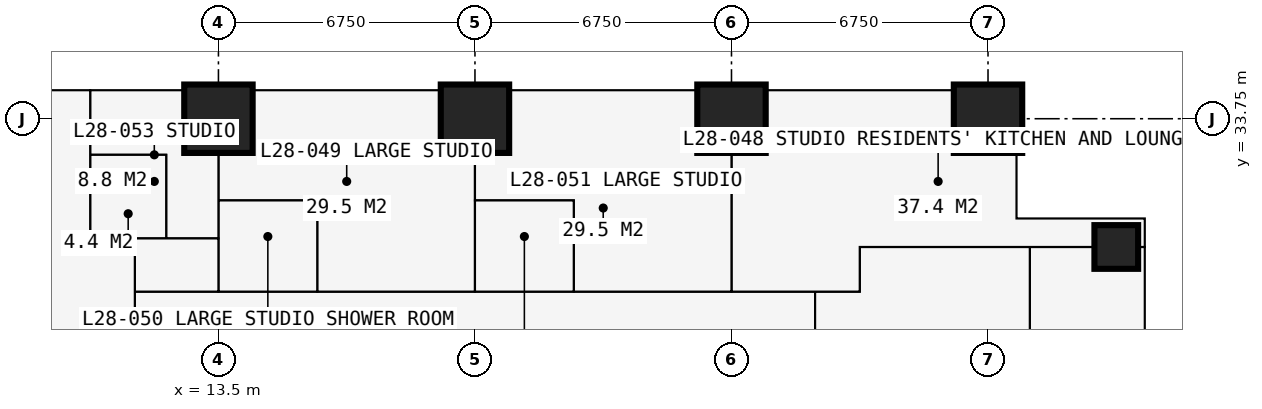
"""IFC4 building model, lengths in metres.
Left out: names, types, materials, properties, quantities, classifications, styles, units other than length and angle.
Written with IfcOpenShell. Run it as: python <this file> out.ifc"""

import sys

from ifc_helpers import new_model, si_unit, direction, frame, frame_2d, origin, origin_2d, place, context, subcontext, project, spatial, rectangle, extrude, element, fill, save


model = new_model("IFC4")
c1 = context("Model", 3, precision=1e-05, world=origin(), true_north=direction((0.0, 1.0)))
c2 = subcontext(c1, "Body", "Model", "MODEL_VIEW")
j1 = project(units=[si_unit("LENGTHUNIT", "METRE"), si_unit("PLANEANGLEUNIT", "RADIAN")], contexts=[c1])
p1 = place(None, origin())
s1 = spatial("IfcSite", under=j1, at=p1, CompositionType="ELEMENT")
p2 = place(p1, origin())
s2 = spatial("IfcBuilding", under=s1, at=p2, CompositionType="ELEMENT")
p3 = place(p2, frame((0.0, 0.0, 105.3)))
s3 = spatial("IfcBuildingStorey", under=s2, at=p3, CompositionType="ELEMENT", Elevation=105.3)
for number, where, z_axis, x_axis in (
    (1, (13.5, 33.75, 0.0), (0.0, 0.0, 1.0), (1.0, 0.0, 0.0)),
    (2, (20.25, 33.75, 0.0), (0.0, 0.0, 1.0), (1.0, 0.0, 0.0)),
    (3, (27.0, 33.75, 0.0), (0.0, 0.0, 1.0), (1.0, 0.0, 0.0)),
    (4, (33.75, 33.75, 0.0), (0.0, 0.0, 1.0), (1.0, 0.0, 0.0)),
):
    element("IfcColumn", number, at=place(p3, frame(where, z_axis=z_axis, x_axis=x_axis)), inside=s3, PredefinedType="COLUMN", context=c2, shape_type="SweptSolid", body=[
        extrude(rectangle(XDim=1.8, YDim=1.8, at=origin_2d()), origin(), (0.0, 0.0, 1.0), 3.6),
    ])
p4 = place(p3, frame((37.125, 30.375, 0.0), z_axis=(0.0, 0.0, 1.0), x_axis=(1.0, 0.0, 0.0)))
e5 = element("IfcColumn", 5, at=p4, inside=s3, PredefinedType="COLUMN", context=c2, shape_type="SweptSolid", body=[
    extrude(rectangle(XDim=1.15, YDim=1.15, at=origin_2d()), origin(), (0.0, 0.0, 1.0), 3.6),
])
p5 = place(p3, frame((37.875, 27.75, 0.0), z_axis=(0.0, 0.0, 1.0), x_axis=(0.0, 1.0, 0.0)))
e6 = element("IfcWall", 6, at=p5, inside=s3, PredefinedType="SOLIDWALL", context=c2, shape_type="SweptSolid", body=[
    extrude(rectangle(XDim=3.375, YDim=0.3, at=frame_2d((1.688, 0.0))), origin(), (0.0, 0.0, 1.0), 3.375),
])
p6 = place(p5, frame((0.788, 0.0, 0.6)))
e7 = element("IfcOpeningElement", 7, at=p6, cuts=e6, PredefinedType="OPENING", context=c2, shape_type="SweptSolid", body=[
    extrude(rectangle(XDim=1.8, YDim=2.1, at=frame_2d((0.9, 1.05))), frame((0.0, 0.16, 0.0), z_axis=(0.0, -1.0, 0.0), x_axis=(1.0, 0.0, 0.0)), (0.0, 0.0, 1.0), 0.32),
])
p7 = place(p3, frame((37.875, 31.125, 0.0), z_axis=(0.0, 0.0, 1.0), x_axis=(-1.0, 0.0, 0.0)))
e8 = element("IfcWall", 8, at=p7, inside=s3, PredefinedType="SOLIDWALL", context=c2, shape_type="SweptSolid", body=[
    extrude(rectangle(XDim=3.375, YDim=0.3, at=frame_2d((1.688, 0.0))), origin(), (0.0, 0.0, 1.0), 3.375),
])
p8 = place(p7, frame((0.788, 0.0, 0.6)))
e9 = element("IfcOpeningElement", 9, at=p8, cuts=e8, PredefinedType="OPENING", context=c2, shape_type="SweptSolid", body=[
    extrude(rectangle(XDim=1.8, YDim=2.1, at=frame_2d((0.9, 1.05))), frame((0.0, 0.16, 0.0), z_axis=(0.0, -1.0, 0.0), x_axis=(1.0, 0.0, 0.0)), (0.0, 0.0, 1.0), 0.32),
])
p9 = place(p3, frame((34.5, 31.125, 0.0), z_axis=(0.0, 0.0, 1.0), x_axis=(0.0, 1.0, 0.0)))
e10 = element("IfcWall", 10, at=p9, inside=s3, PredefinedType="SOLIDWALL", context=c2, shape_type="SweptSolid", body=[
    extrude(rectangle(XDim=3.375, YDim=0.3, at=frame_2d((1.688, 0.0))), origin(), (0.0, 0.0, 1.0), 3.375),
])
p10 = place(p9, frame((0.343, 0.0, 0.9)))
e11 = element("IfcOpeningElement", 11, at=p10, cuts=e10, PredefinedType="OPENING", context=c2, shape_type="SweptSolid", body=[
    extrude(rectangle(XDim=1.2, YDim=1.8, at=frame_2d((0.6, 0.9))), frame((0.0, 0.16, 0.0), z_axis=(0.0, -1.0, 0.0), x_axis=(1.0, 0.0, 0.0)), (0.0, 0.0, 1.0), 0.32),
])
p11 = place(p3, frame((20.25, 34.5, 0.0), z_axis=(0.0, 0.0, 1.0), x_axis=(1.0, 0.0, 0.0)))
e12 = element("IfcWall", 12, at=p11, inside=s3, PredefinedType="SOLIDWALL", context=c2, shape_type="SweptSolid", body=[
    extrude(rectangle(XDim=6.75, YDim=0.15, at=frame_2d((3.375, 0.0))), origin(), (0.0, 0.0, 1.0), 3.375),
])
p12 = place(p11, frame((0.962, 0.0, 0.0)))
e13 = element("IfcOpeningElement", 13, at=p12, cuts=e12, PredefinedType="OPENING", context=c2, shape_type="SweptSolid", body=[
    extrude(rectangle(XDim=1.0, YDim=2.2, at=frame_2d((0.5, 1.1))), frame((0.0, 0.085, 0.0), z_axis=(0.0, -1.0, 0.0), x_axis=(1.0, 0.0, 0.0)), (0.0, 0.0, 1.0), 0.17),
])
p13 = place(p11, frame((2.025, 0.0, 0.9)))
e14 = element("IfcOpeningElement", 14, at=p13, cuts=e12, PredefinedType="OPENING", context=c2, shape_type="SweptSolid", body=[
    extrude(rectangle(XDim=1.2, YDim=1.8, at=frame_2d((0.6, 0.9))), frame((0.0, 0.085, 0.0), z_axis=(0.0, -1.0, 0.0), x_axis=(1.0, 0.0, 0.0)), (0.0, 0.0, 1.0), 0.17),
])
p14 = place(p11, frame((4.788, 0.0, 0.0)))
e15 = element("IfcOpeningElement", 15, at=p14, cuts=e12, PredefinedType="OPENING", context=c2, shape_type="SweptSolid", body=[
    extrude(rectangle(XDim=1.0, YDim=2.2, at=frame_2d((0.5, 1.1))), frame((0.0, 0.085, 0.0), z_axis=(0.0, -1.0, 0.0), x_axis=(1.0, 0.0, 0.0)), (0.0, 0.0, 1.0), 0.17),
])
p15 = place(p11, frame((3.525, 0.0, 0.9)))
e16 = element("IfcOpeningElement", 16, at=p15, cuts=e12, PredefinedType="OPENING", context=c2, shape_type="SweptSolid", body=[
    extrude(rectangle(XDim=1.2, YDim=1.8, at=frame_2d((0.6, 0.9))), frame((0.0, 0.085, 0.0), z_axis=(0.0, -1.0, 0.0), x_axis=(1.0, 0.0, 0.0)), (0.0, 0.0, 1.0), 0.17),
])
p16 = place(p3, frame((23.625, 34.6, 0.0), z_axis=(0.0, 0.0, 1.0), x_axis=(0.0, 1.0, 0.0)))
e17 = element("IfcWall", 17, at=p16, inside=s3, PredefinedType="USERDEFINED", context=c2, shape_type="SweptSolid", body=[
    extrude(rectangle(XDim=2.2, YDim=1.0, at=frame_2d((1.1, 0.0))), origin(), (0.0, 0.0, 1.0), 0.9),
])
p17 = place(p3, frame((10.125, 30.6, 0.0), z_axis=(0.0, 0.0, 1.0), x_axis=(0.0, 1.0, 0.0)))
e18 = element("IfcWall", 18, at=p17, inside=s3, PredefinedType="PARTITIONING", context=c2, shape_type="SweptSolid", body=[
    extrude(rectangle(XDim=3.884, YDim=0.1, at=frame_2d((1.942, 0.0))), origin(), (0.0, 0.0, 1.0), 3.375),
])
p18 = place(p3, frame((10.125, 30.6, 0.0), z_axis=(0.0, 0.0, 1.0), x_axis=(1.0, 0.0, 0.0)))
e19 = element("IfcWall", 19, at=p18, inside=s3, PredefinedType="PARTITIONING", context=c2, shape_type="SweptSolid", body=[
    extrude(rectangle(XDim=3.375, YDim=0.1, at=frame_2d((1.688, 0.0))), origin(), (0.0, 0.0, 1.0), 3.375),
])
p19 = place(p18, frame((2.2, 0.0, 0.0)))
e20 = element("IfcOpeningElement", 20, at=p19, cuts=e19, PredefinedType="OPENING", context=c2, shape_type="SweptSolid", body=[
    extrude(rectangle(XDim=0.95, YDim=2.2, at=frame_2d((0.475, 1.1))), frame((0.0, 0.06, 0.0), z_axis=(0.0, -1.0, 0.0), x_axis=(1.0, 0.0, 0.0)), (0.0, 0.0, 1.0), 0.12),
])
p20 = place(p3, frame((10.125, 32.8, 0.0), z_axis=(0.0, 0.0, 1.0), x_axis=(1.0, 0.0, 0.0)))
e21 = element("IfcWall", 21, at=p20, inside=s3, PredefinedType="PARTITIONING", context=c2, shape_type="SweptSolid", body=[
    extrude(rectangle(XDim=2.0, YDim=0.1, at=frame_2d((1.0, 0.0))), origin(), (0.0, 0.0, 1.0), 3.375),
])
p21 = place(p3, frame((11.3, 11.3, 0.0), z_axis=(0.0, 0.0, 1.0), x_axis=(0.0, 1.0, 0.0)))
e22 = element("IfcWall", 22, at=p21, inside=s3, PredefinedType="PARTITIONING", context=c2, shape_type="SweptSolid", body=[
    extrude(rectangle(XDim=19.3, YDim=0.15, at=frame_2d((9.65, 0.0))), origin(), (0.0, 0.0, 1.0), 3.375),
])
p22 = place(p21, frame((13.525, 0.0, 0.0)))
e23 = element("IfcOpeningElement", 23, at=p22, cuts=e22, PredefinedType="OPENING", context=c2, shape_type="SweptSolid", body=[
    extrude(rectangle(XDim=1.0, YDim=2.2, at=frame_2d((0.5, 1.1))), frame((0.0, 0.085, 0.0), z_axis=(0.0, -1.0, 0.0), x_axis=(1.0, 0.0, 0.0)), (0.0, 0.0, 1.0), 0.17),
])
p23 = place(p21, frame((10.438, 0.0, 0.0)))
e24 = element("IfcOpeningElement", 24, at=p23, cuts=e22, PredefinedType="OPENING", context=c2, shape_type="SweptSolid", body=[
    extrude(rectangle(XDim=1.0, YDim=2.2, at=frame_2d((0.5, 1.1))), frame((0.0, 0.085, 0.0), z_axis=(0.0, -1.0, 0.0), x_axis=(1.0, 0.0, 0.0)), (0.0, 0.0, 1.0), 0.17),
])
p24 = place(p3, frame((11.3, 29.2, 0.0), z_axis=(0.0, 0.0, 1.0), x_axis=(1.0, 0.0, 0.0)))
e25 = element("IfcWall", 25, at=p24, inside=s3, PredefinedType="PARTITIONING", context=c2, shape_type="SweptSolid", body=[
    extrude(rectangle(XDim=19.075, YDim=0.1, at=frame_2d((9.538, 0.0))), origin(), (0.0, 0.0, 1.0), 3.375),
])
p25 = place(p24, frame((6.4, 0.0, 0.0)))
e26 = element("IfcOpeningElement", 26, at=p25, cuts=e25, PredefinedType="OPENING", context=c2, shape_type="SweptSolid", body=[
    extrude(rectangle(XDim=0.95, YDim=2.2, at=frame_2d((0.475, 1.1))), frame((0.0, 0.06, 0.0), z_axis=(0.0, -1.0, 0.0), x_axis=(1.0, 0.0, 0.0)), (0.0, 0.0, 1.0), 0.12),
])
p26 = place(p24, frame((13.15, 0.0, 0.0)))
e27 = element("IfcOpeningElement", 27, at=p26, cuts=e25, PredefinedType="OPENING", context=c2, shape_type="SweptSolid", body=[
    extrude(rectangle(XDim=0.95, YDim=2.2, at=frame_2d((0.475, 1.1))), frame((0.0, 0.06, 0.0), z_axis=(0.0, -1.0, 0.0), x_axis=(1.0, 0.0, 0.0)), (0.0, 0.0, 1.0), 0.12),
])
p27 = place(p24, frame((0.6, 0.0, 0.0)))
e28 = element("IfcOpeningElement", 28, at=p27, cuts=e25, PredefinedType="OPENING", context=c2, shape_type="SweptSolid", body=[
    extrude(rectangle(XDim=1.0, YDim=2.2, at=frame_2d((0.5, 1.1))), frame((0.0, 0.06, 0.0), z_axis=(0.0, -1.0, 0.0), x_axis=(1.0, 0.0, 0.0)), (0.0, 0.0, 1.0), 0.12),
])
p28 = place(p3, frame((12.125, 30.6, 0.0), z_axis=(0.0, 0.0, 1.0), x_axis=(0.0, 1.0, 0.0)))
e29 = element("IfcWall", 29, at=p28, inside=s3, PredefinedType="PARTITIONING", context=c2, shape_type="SweptSolid", body=[
    extrude(rectangle(XDim=2.2, YDim=0.1, at=frame_2d((1.1, 0.0))), origin(), (0.0, 0.0, 1.0), 3.375),
])
p29 = place(p28, frame((0.65, 0.0, 0.0)))
e30 = element("IfcOpeningElement", 30, at=p29, cuts=e29, PredefinedType="OPENING", context=c2, shape_type="SweptSolid", body=[
    extrude(rectangle(XDim=0.9, YDim=2.2, at=frame_2d((0.45, 1.1))), frame((0.0, 0.06, 0.0), z_axis=(0.0, -1.0, 0.0), x_axis=(1.0, 0.0, 0.0)), (0.0, 0.0, 1.0), 0.12),
])
p30 = place(p3, frame((13.5, 29.2, 0.0), z_axis=(0.0, 0.0, 1.0), x_axis=(0.0, 1.0, 0.0)))
e31 = element("IfcWall", 31, at=p30, inside=s3, PredefinedType="PARTITIONING", context=c2, shape_type="SweptSolid", body=[
    extrude(rectangle(XDim=5.284, YDim=0.175, at=frame_2d((2.642, 0.0))), origin(), (0.0, 0.0, 1.0), 2.61),
])
p31 = place(p3, frame((13.5, 31.6, 0.0), z_axis=(0.0, 0.0, 1.0), x_axis=(1.0, 0.0, 0.0)))
e32 = element("IfcWall", 32, at=p31, inside=s3, PredefinedType="PARTITIONING", context=c2, shape_type="SweptSolid", body=[
    extrude(rectangle(XDim=2.6, YDim=0.1, at=frame_2d((1.3, 0.0))), origin(), (0.0, 0.0, 1.0), 3.375),
])
p32 = place(p31, frame((0.85, 0.0, 0.0)))
e33 = element("IfcOpeningElement", 33, at=p32, cuts=e32, PredefinedType="OPENING", context=c2, shape_type="SweptSolid", body=[
    extrude(rectangle(XDim=0.9, YDim=2.2, at=frame_2d((0.45, 1.1))), frame((0.0, 0.06, 0.0), z_axis=(0.0, -1.0, 0.0), x_axis=(1.0, 0.0, 0.0)), (0.0, 0.0, 1.0), 0.12),
])
p33 = place(p3, frame((16.1, 29.2, 0.0), z_axis=(0.0, 0.0, 1.0), x_axis=(0.0, 1.0, 0.0)))
e34 = element("IfcWall", 34, at=p33, inside=s3, PredefinedType="PARTITIONING", context=c2, shape_type="SweptSolid", body=[
    extrude(rectangle(XDim=2.4, YDim=0.1, at=frame_2d((1.2, 0.0))), origin(), (0.0, 0.0, 1.0), 3.375),
])
p34 = place(p3, frame((20.25, 29.2, 0.0), z_axis=(0.0, 0.0, 1.0), x_axis=(0.0, 1.0, 0.0)))
e35 = element("IfcWall", 35, at=p34, inside=s3, PredefinedType="PARTITIONING", context=c2, shape_type="SweptSolid", body=[
    extrude(rectangle(XDim=5.284, YDim=0.175, at=frame_2d((2.642, 0.0))), origin(), (0.0, 0.0, 1.0), 2.61),
])
p35 = place(p34, frame((0.75, 0.0, 0.0)))
e36 = element("IfcOpeningElement", 36, at=p35, cuts=e35, PredefinedType="OPENING", context=c2, shape_type="SweptSolid", body=[
    extrude(rectangle(XDim=0.9, YDim=2.2, at=frame_2d((0.45, 1.1))), frame((0.0, 0.097, 0.0), z_axis=(0.0, -1.0, 0.0), x_axis=(1.0, 0.0, 0.0)), (0.0, 0.0, 1.0), 0.195),
])
p36 = place(p3, frame((20.25, 31.6, 0.0), z_axis=(0.0, 0.0, 1.0), x_axis=(1.0, 0.0, 0.0)))
e37 = element("IfcWall", 37, at=p36, inside=s3, PredefinedType="PARTITIONING", context=c2, shape_type="SweptSolid", body=[
    extrude(rectangle(XDim=2.6, YDim=0.1, at=frame_2d((1.3, 0.0))), origin(), (0.0, 0.0, 1.0), 3.375),
])
p37 = place(p3, frame((22.85, 29.2, 0.0), z_axis=(0.0, 0.0, 1.0), x_axis=(0.0, 1.0, 0.0)))
e38 = element("IfcWall", 38, at=p37, inside=s3, PredefinedType="PARTITIONING", context=c2, shape_type="SweptSolid", body=[
    extrude(rectangle(XDim=2.4, YDim=0.1, at=frame_2d((1.2, 0.0))), origin(), (0.0, 0.0, 1.0), 3.375),
])
p38 = place(p3, frame((27.0, 29.2, 0.0), z_axis=(0.0, 0.0, 1.0), x_axis=(0.0, 1.0, 0.0)))
e39 = element("IfcWall", 39, at=p38, inside=s3, PredefinedType="PARTITIONING", context=c2, shape_type="SweptSolid", body=[
    extrude(rectangle(XDim=5.284, YDim=0.15, at=frame_2d((2.642, 0.0))), origin(), (0.0, 0.0, 1.0), 2.61),
])
p39 = place(p3, frame((29.2, 11.3, 0.0), z_axis=(0.0, 0.0, 1.0), x_axis=(0.0, 1.0, 0.0)))
e40 = element("IfcWall", 40, at=p39, inside=s3, PredefinedType="PARTITIONING", context=c2, shape_type="SweptSolid", body=[
    extrude(rectangle(XDim=17.9, YDim=0.2, at=frame_2d((8.95, 0.0))), origin(), (0.0, 0.0, 1.0), 3.375),
])
p40 = place(p39, frame((8.35, 0.0, 0.0)))
e41 = element("IfcOpeningElement", 41, at=p40, cuts=e40, PredefinedType="OPENING", context=c2, shape_type="SweptSolid", body=[
    extrude(rectangle(XDim=1.2, YDim=2.2, at=frame_2d((0.6, 1.1))), frame((0.0, 0.11, 0.0), z_axis=(0.0, -1.0, 0.0), x_axis=(1.0, 0.0, 0.0)), (0.0, 0.0, 1.0), 0.22),
])
p41 = place(p3, frame((30.375, 29.2, 0.0), z_axis=(0.0, 0.0, 1.0), x_axis=(0.0, 1.0, 0.0)))
e42 = element("IfcWall", 42, at=p41, inside=s3, PredefinedType="PARTITIONING", context=c2, shape_type="SweptSolid", body=[
    extrude(rectangle(XDim=1.175, YDim=0.15, at=frame_2d((0.587, 0.0))), origin(), (0.0, 0.0, 1.0), 3.375),
])
p42 = place(p3, frame((30.375, 30.375, 0.0), z_axis=(0.0, 0.0, 1.0), x_axis=(1.0, 0.0, 0.0)))
e43 = element("IfcWall", 43, at=p42, inside=s3, PredefinedType="PARTITIONING", context=c2, shape_type="SweptSolid", body=[
    extrude(rectangle(XDim=7.35, YDim=0.15, at=frame_2d((3.675, 0.0))), origin(), (0.0, 0.0, 1.0), 2.877),
])
p43 = place(p42, frame((5.125, 0.0, 0.0)))
e44 = element("IfcOpeningElement", 44, at=p43, cuts=e43, PredefinedType="OPENING", context=c2, shape_type="SweptSolid", body=[
    extrude(rectangle(XDim=1.0, YDim=2.2, at=frame_2d((0.5, 1.1))), frame((0.0, 0.085, 0.0), z_axis=(0.0, -1.0, 0.0), x_axis=(1.0, 0.0, 0.0)), (0.0, 0.0, 1.0), 0.17),
])
p44 = place(p3, frame((34.85, 12.55, 0.0), z_axis=(0.0, 0.0, 1.0), x_axis=(0.0, 1.0, 0.0)))
e45 = element("IfcWall", 45, at=p44, inside=s3, PredefinedType="PARTITIONING", context=c2, shape_type="SweptSolid", body=[
    extrude(rectangle(XDim=17.825, YDim=0.15, at=frame_2d((8.913, 0.0))), origin(), (0.0, 0.0, 1.0), 3.375),
])
p45 = place(p44, frame((8.6, 0.0, 0.0)))
e46 = element("IfcOpeningElement", 46, at=p45, cuts=e45, PredefinedType="OPENING", context=c2, shape_type="SweptSolid", body=[
    extrude(rectangle(XDim=0.95, YDim=2.2, at=frame_2d((0.475, 1.1))), frame((0.0, 0.085, 0.0), z_axis=(0.0, -1.0, 0.0), x_axis=(1.0, 0.0, 0.0)), (0.0, 0.0, 1.0), 0.17),
])
p46 = place(p6, origin())
e47 = element("IfcWindow", 47, at=p46, inside=s3, PartitioningType="SINGLE_PANEL", PredefinedType="WINDOW", context=c2, shape_type="SweptSolid", body=[
    extrude(rectangle(XDim=1.8, YDim=2.1, at=frame_2d((0.9, 1.05))), frame((0.0, 0.03, 0.0), z_axis=(0.0, -1.0, 0.0), x_axis=(1.0, 0.0, 0.0)), (0.0, 0.0, 1.0), 0.06),
])
fill(e7, e47)
p47 = place(p8, origin())
e48 = element("IfcWindow", 48, at=p47, inside=s3, PartitioningType="SINGLE_PANEL", PredefinedType="WINDOW", context=c2, shape_type="SweptSolid", body=[
    extrude(rectangle(XDim=1.8, YDim=2.1, at=frame_2d((0.9, 1.05))), frame((0.0, 0.03, 0.0), z_axis=(0.0, -1.0, 0.0), x_axis=(1.0, 0.0, 0.0)), (0.0, 0.0, 1.0), 0.06),
])
fill(e9, e48)
p48 = place(p10, origin())
e49 = element("IfcWindow", 49, at=p48, inside=s3, PartitioningType="SINGLE_PANEL", PredefinedType="WINDOW", context=c2, shape_type="SweptSolid", body=[
    extrude(rectangle(XDim=1.2, YDim=1.8, at=frame_2d((0.6, 0.9))), frame((0.0, 0.03, 0.0), z_axis=(0.0, -1.0, 0.0), x_axis=(1.0, 0.0, 0.0)), (0.0, 0.0, 1.0), 0.06),
])
fill(e11, e49)
p49 = place(p12, origin())
e50 = element("IfcDoor", 50, at=p49, inside=s3, OperationType="SINGLE_SWING_LEFT", PredefinedType="DOOR", context=c2, shape_type="SweptSolid", body=[
    extrude(rectangle(XDim=1.0, YDim=2.2, at=frame_2d((0.5, 1.1))), frame((0.0, 0.025, 0.0), z_axis=(0.0, -1.0, 0.0), x_axis=(1.0, 0.0, 0.0)), (0.0, 0.0, 1.0), 0.05),
])
fill(e13, e50)
p50 = place(p13, origin())
e51 = element("IfcWindow", 51, at=p50, inside=s3, PartitioningType="SINGLE_PANEL", PredefinedType="WINDOW", context=c2, shape_type="SweptSolid", body=[
    extrude(rectangle(XDim=1.2, YDim=1.8, at=frame_2d((0.6, 0.9))), frame((0.0, 0.03, 0.0), z_axis=(0.0, -1.0, 0.0), x_axis=(1.0, 0.0, 0.0)), (0.0, 0.0, 1.0), 0.06),
])
fill(e14, e51)
p51 = place(p14, origin())
e52 = element("IfcDoor", 52, at=p51, inside=s3, OperationType="SINGLE_SWING_RIGHT", PredefinedType="DOOR", context=c2, shape_type="SweptSolid", body=[
    extrude(rectangle(XDim=1.0, YDim=2.2, at=frame_2d((0.5, 1.1))), frame((0.0, 0.025, 0.0), z_axis=(0.0, -1.0, 0.0), x_axis=(1.0, 0.0, 0.0)), (0.0, 0.0, 1.0), 0.05),
])
fill(e15, e52)
p52 = place(p15, origin())
e53 = element("IfcWindow", 53, at=p52, inside=s3, PartitioningType="SINGLE_PANEL", PredefinedType="WINDOW", context=c2, shape_type="SweptSolid", body=[
    extrude(rectangle(XDim=1.2, YDim=1.8, at=frame_2d((0.6, 0.9))), frame((0.0, 0.03, 0.0), z_axis=(0.0, -1.0, 0.0), x_axis=(1.0, 0.0, 0.0)), (0.0, 0.0, 1.0), 0.06),
])
fill(e16, e53)
p53 = place(p43, origin())
e54 = element("IfcDoor", 54, at=p53, inside=s3, OperationType="SINGLE_SWING_LEFT", PredefinedType="DOOR", context=c2, shape_type="SweptSolid", body=[
    extrude(rectangle(XDim=1.0, YDim=2.2, at=frame_2d((0.5, 1.1))), frame((0.0, 0.025, 0.0), z_axis=(0.0, -1.0, 0.0), x_axis=(1.0, 0.0, 0.0)), (0.0, 0.0, 1.0), 0.05),
])
fill(e44, e54)
p54 = place(p25, origin())
e55 = element("IfcDoor", 55, at=p54, inside=s3, OperationType="SINGLE_SWING_LEFT", PredefinedType="DOOR", context=c2, shape_type="SweptSolid", body=[
    extrude(rectangle(XDim=0.95, YDim=2.2, at=frame_2d((0.475, 1.1))), frame((0.0, 0.025, 0.0), z_axis=(0.0, -1.0, 0.0), x_axis=(1.0, 0.0, 0.0)), (0.0, 0.0, 1.0), 0.05),
])
fill(e26, e55)
p55 = place(p32, origin())
e56 = element("IfcDoor", 56, at=p55, inside=s3, OperationType="SINGLE_SWING_RIGHT", PredefinedType="DOOR", context=c2, shape_type="SweptSolid", body=[
    extrude(rectangle(XDim=0.9, YDim=2.2, at=frame_2d((0.45, 1.1))), frame((0.0, 0.025, 0.0), z_axis=(0.0, -1.0, 0.0), x_axis=(1.0, 0.0, 0.0)), (0.0, 0.0, 1.0), 0.05),
])
fill(e33, e56)
p56 = place(p26, origin())
e57 = element("IfcDoor", 57, at=p56, inside=s3, OperationType="SINGLE_SWING_LEFT", PredefinedType="DOOR", context=c2, shape_type="SweptSolid", body=[
    extrude(rectangle(XDim=0.95, YDim=2.2, at=frame_2d((0.475, 1.1))), frame((0.0, 0.025, 0.0), z_axis=(0.0, -1.0, 0.0), x_axis=(1.0, 0.0, 0.0)), (0.0, 0.0, 1.0), 0.05),
])
fill(e27, e57)
p57 = place(p35, origin())
e58 = element("IfcDoor", 58, at=p57, inside=s3, OperationType="SINGLE_SWING_RIGHT", PredefinedType="DOOR", context=c2, shape_type="SweptSolid", body=[
    extrude(rectangle(XDim=0.9, YDim=2.2, at=frame_2d((0.45, 1.1))), frame((0.0, 0.025, 0.0), z_axis=(0.0, -1.0, 0.0), x_axis=(1.0, 0.0, 0.0)), (0.0, 0.0, 1.0), 0.05),
])
fill(e36, e58)
p58 = place(p19, origin())
e59 = element("IfcDoor", 59, at=p58, inside=s3, OperationType="SINGLE_SWING_LEFT", PredefinedType="DOOR", context=c2, shape_type="SweptSolid", body=[
    extrude(rectangle(XDim=0.95, YDim=2.2, at=frame_2d((0.475, 1.1))), frame((0.0, 0.025, 0.0), z_axis=(0.0, -1.0, 0.0), x_axis=(1.0, 0.0, 0.0)), (0.0, 0.0, 1.0), 0.05),
])
fill(e20, e59)
p59 = place(p29, origin())
e60 = element("IfcDoor", 60, at=p59, inside=s3, OperationType="SINGLE_SWING_RIGHT", PredefinedType="DOOR", context=c2, shape_type="SweptSolid", body=[
    extrude(rectangle(XDim=0.9, YDim=2.2, at=frame_2d((0.45, 1.1))), frame((0.0, 0.025, 0.0), z_axis=(0.0, -1.0, 0.0), x_axis=(1.0, 0.0, 0.0)), (0.0, 0.0, 1.0), 0.05),
])
fill(e30, e60)
p60 = place(p27, origin())
e61 = element("IfcDoor", 61, at=p60, inside=s3, OperationType="SINGLE_SWING_LEFT", PredefinedType="DOOR", context=c2, shape_type="SweptSolid", body=[
    extrude(rectangle(XDim=1.0, YDim=2.2, at=frame_2d((0.5, 1.1))), frame((0.0, 0.025, 0.0), z_axis=(0.0, -1.0, 0.0), x_axis=(1.0, 0.0, 0.0)), (0.0, 0.0, 1.0), 0.05),
])
fill(e28, e61)
save(model, sys.argv[1])
